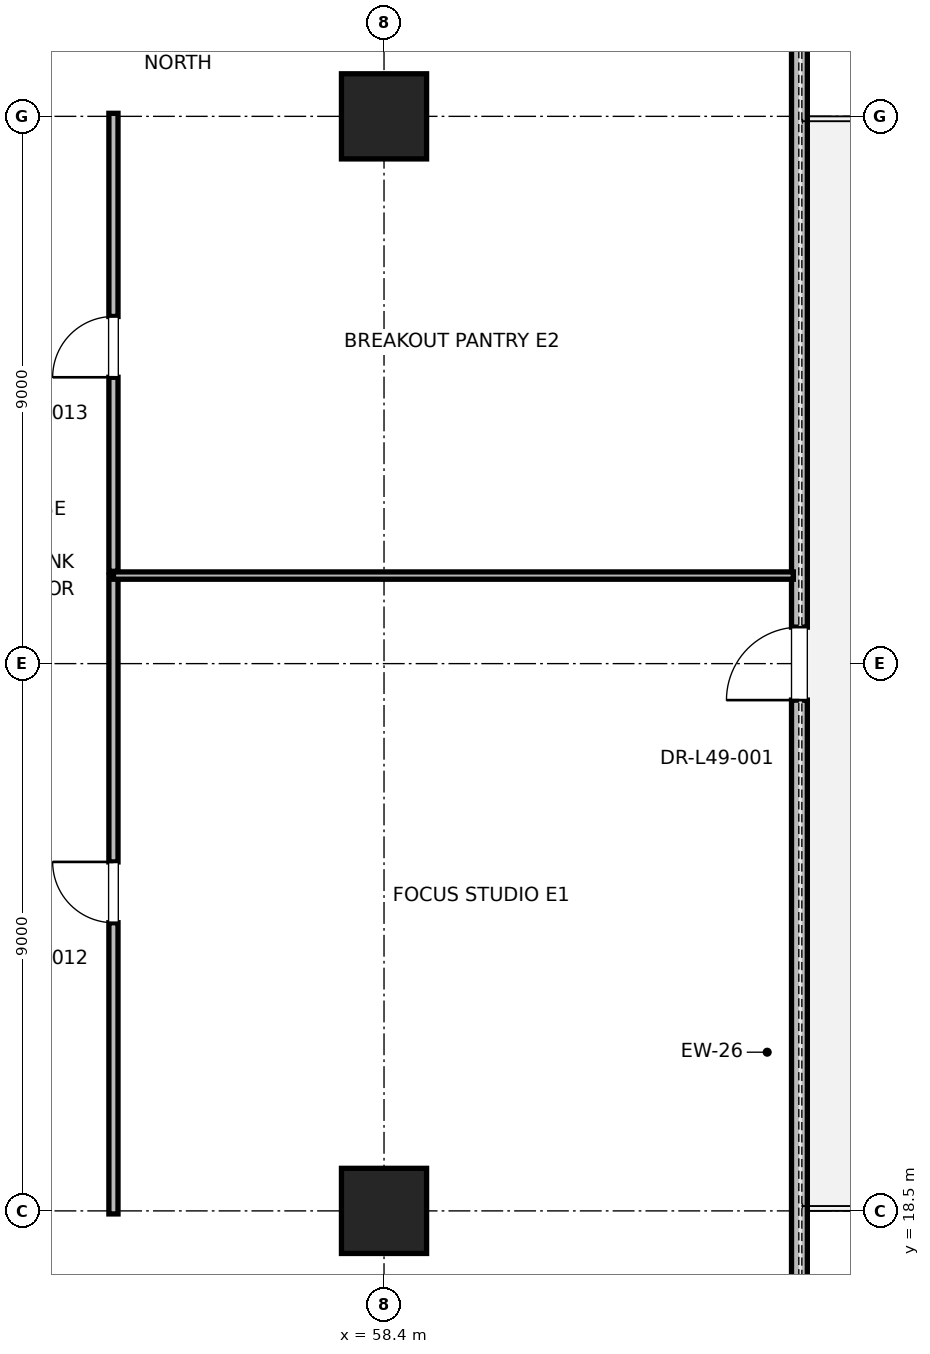
"""IFC4 building model, lengths in metres.
Left out: names, types, materials, properties, quantities, classifications, styles, units other than length and angle.
Written with IfcOpenShell. Run it as: python <this file> out.ifc"""

import sys

from ifc_helpers import new_model, si_unit, direction, frame, frame_2d, origin, origin_2d, place, context, subcontext, project, spatial, rectangle, extrude, element, fill, save


model = new_model("IFC4")
c1 = context("Model", 3, precision=1e-05, world=origin(), true_north=direction((0.0, 1.0)))
c2 = subcontext(c1, "Body", "Model", "MODEL_VIEW")
j1 = project(units=[si_unit("LENGTHUNIT", "METRE"), si_unit("PLANEANGLEUNIT", "RADIAN")], contexts=[c1])
p1 = place(None, origin())
s1 = spatial("IfcSite", under=j1, at=p1, CompositionType="ELEMENT")
p2 = place(p1, origin())
s2 = spatial("IfcBuilding", under=s1, at=p2, CompositionType="ELEMENT")
p3 = place(p2, frame((0.0, 0.0, 213.2)))
s3 = spatial("IfcBuildingStorey", under=s2, at=p3, CompositionType="ELEMENT", Elevation=213.2)
for number, where, z_axis, x_axis in (
    (1, (58.4, 18.5, 0.0), (0.0, 0.0, 1.0), (1.0, 0.0, 0.0)),
    (2, (58.4, 36.5, 0.0), (0.0, 0.0, 1.0), (1.0, 0.0, 0.0)),
):
    element("IfcColumn", number, at=place(p3, frame(where, z_axis=z_axis, x_axis=x_axis)), inside=s3, PredefinedType="COLUMN", context=c2, shape_type="SweptSolid", body=[
        extrude(rectangle(XDim=1.4, YDim=1.4, at=origin_2d()), origin(), (0.0, 0.0, 1.0), 4.0),
    ])
p4 = place(p3, frame((65.232, 9.119, 0.0), z_axis=(0.0, 0.0, 1.0), x_axis=(0.0, 1.0, 0.0)))
e3 = element("IfcWall", 3, at=p4, inside=s3, PredefinedType="PARAPET", context=c2, shape_type="SweptSolid", body=[
    extrude(rectangle(XDim=36.761, YDim=0.26, at=frame_2d((18.381, 0.0))), origin(), (0.0, 0.0, 1.0), 3.047),
])
p5 = place(p4, frame((4.2, 0.0, 0.85)))
e4 = element("IfcOpeningElement", 4, at=p5, cuts=e3, PredefinedType="OPENING", context=c2, shape_type="SweptSolid", body=[
    extrude(rectangle(XDim=2.0, YDim=2.3, at=frame_2d((1.0, 1.15))), frame((0.0, 0.13, 0.0), z_axis=(0.0, -1.0, 0.0), x_axis=(1.0, 0.0, 0.0)), (0.0, 0.0, 1.0), 0.26),
])
p6 = place(p4, frame((17.781, 0.0, 0.0)))
e5 = element("IfcOpeningElement", 5, at=p6, cuts=e3, PredefinedType="OPENING", context=c2, shape_type="SweptSolid", body=[
    extrude(rectangle(XDim=1.2, YDim=2.2, at=frame_2d((0.6, 1.1))), frame((0.0, 0.13, 0.0), z_axis=(0.0, -1.0, 0.0), x_axis=(1.0, 0.0, 0.0)), (0.0, 0.0, 1.0), 0.26),
])
p7 = place(p4, frame((30.561, 0.0, 0.85)))
e6 = element("IfcOpeningElement", 6, at=p7, cuts=e3, PredefinedType="OPENING", context=c2, shape_type="SweptSolid", body=[
    extrude(rectangle(XDim=2.0, YDim=2.3, at=frame_2d((1.0, 1.15))), frame((0.0, 0.13, 0.0), z_axis=(0.0, -1.0, 0.0), x_axis=(1.0, 0.0, 0.0)), (0.0, 0.0, 1.0), 0.26),
])
p8 = place(p3, frame((53.95, 18.45, 0.0), z_axis=(0.0, 0.0, 1.0), x_axis=(0.0, 1.0, 0.0)))
e7 = element("IfcWall", 7, at=p8, inside=s3, PredefinedType="PARTITIONING", context=c2, shape_type="SweptSolid", body=[
    extrude(rectangle(XDim=10.498, YDim=0.15, at=frame_2d((5.249, 0.0))), origin(), (0.0, 0.0, 1.0), 2.85),
])
p9 = place(p8, frame((4.789, 0.0, 0.0)))
e8 = element("IfcOpeningElement", 8, at=p9, cuts=e7, PredefinedType="OPENING", context=c2, shape_type="SweptSolid", body=[
    extrude(rectangle(XDim=1.0, YDim=2.15, at=frame_2d((0.5, 1.075))), frame((0.0, 0.075, 0.0), z_axis=(0.0, -1.0, 0.0), x_axis=(1.0, 0.0, 0.0)), (0.0, 0.0, 1.0), 0.15),
])
p10 = place(p3, frame((53.95, 28.948, 0.0), z_axis=(0.0, 0.0, 1.0), x_axis=(1.0, 0.0, 0.0)))
e9 = element("IfcWall", 9, at=p10, inside=s3, PredefinedType="PARTITIONING", context=c2, shape_type="SweptSolid", body=[
    extrude(rectangle(XDim=11.182, YDim=0.12, at=frame_2d((5.591, 0.0))), origin(), (0.0, 0.0, 1.0), 2.85),
])
p11 = place(p3, frame((53.95, 29.018, 0.0), z_axis=(0.0, 0.0, 1.0), x_axis=(0.0, 1.0, 0.0)))
e10 = element("IfcWall", 10, at=p11, inside=s3, PredefinedType="PARTITIONING", context=c2, shape_type="SweptSolid", body=[
    extrude(rectangle(XDim=7.532, YDim=0.15, at=frame_2d((3.766, 0.0))), origin(), (0.0, 0.0, 1.0), 2.85),
])
p12 = place(p11, frame((3.191, 0.0, 0.0)))
e11 = element("IfcOpeningElement", 11, at=p12, cuts=e10, PredefinedType="OPENING", context=c2, shape_type="SweptSolid", body=[
    extrude(rectangle(XDim=1.0, YDim=2.15, at=frame_2d((0.5, 1.075))), frame((0.0, 0.075, 0.0), z_axis=(0.0, -1.0, 0.0), x_axis=(1.0, 0.0, 0.0)), (0.0, 0.0, 1.0), 0.15),
])
p13 = place(p6, origin())
e12 = element("IfcDoor", 12, at=p13, inside=s3, OperationType="SINGLE_SWING_LEFT", PredefinedType="DOOR", context=c2, shape_type="SweptSolid", body=[
    extrude(rectangle(XDim=1.2, YDim=2.2, at=frame_2d((0.6, 1.1))), frame((0.0, 0.025, 0.0), z_axis=(0.0, -1.0, 0.0), x_axis=(1.0, 0.0, 0.0)), (0.0, 0.0, 1.0), 0.05),
])
fill(e5, e12)
p14 = place(p9, origin())
e13 = element("IfcDoor", 13, at=p14, inside=s3, OperationType="SINGLE_SWING_RIGHT", PredefinedType="DOOR", context=c2, shape_type="SweptSolid", body=[
    extrude(rectangle(XDim=1.0, YDim=2.15, at=frame_2d((0.5, 1.075))), frame((0.0, 0.025, 0.0), z_axis=(0.0, -1.0, 0.0), x_axis=(1.0, 0.0, 0.0)), (0.0, 0.0, 1.0), 0.05),
])
fill(e8, e13)
p15 = place(p12, origin())
e14 = element("IfcDoor", 14, at=p15, inside=s3, OperationType="SINGLE_SWING_LEFT", PredefinedType="DOOR", context=c2, shape_type="SweptSolid", body=[
    extrude(rectangle(XDim=1.0, YDim=2.15, at=frame_2d((0.5, 1.075))), frame((0.0, 0.025, 0.0), z_axis=(0.0, -1.0, 0.0), x_axis=(1.0, 0.0, 0.0)), (0.0, 0.0, 1.0), 0.05),
])
fill(e11, e14)
save(model, sys.argv[1])
